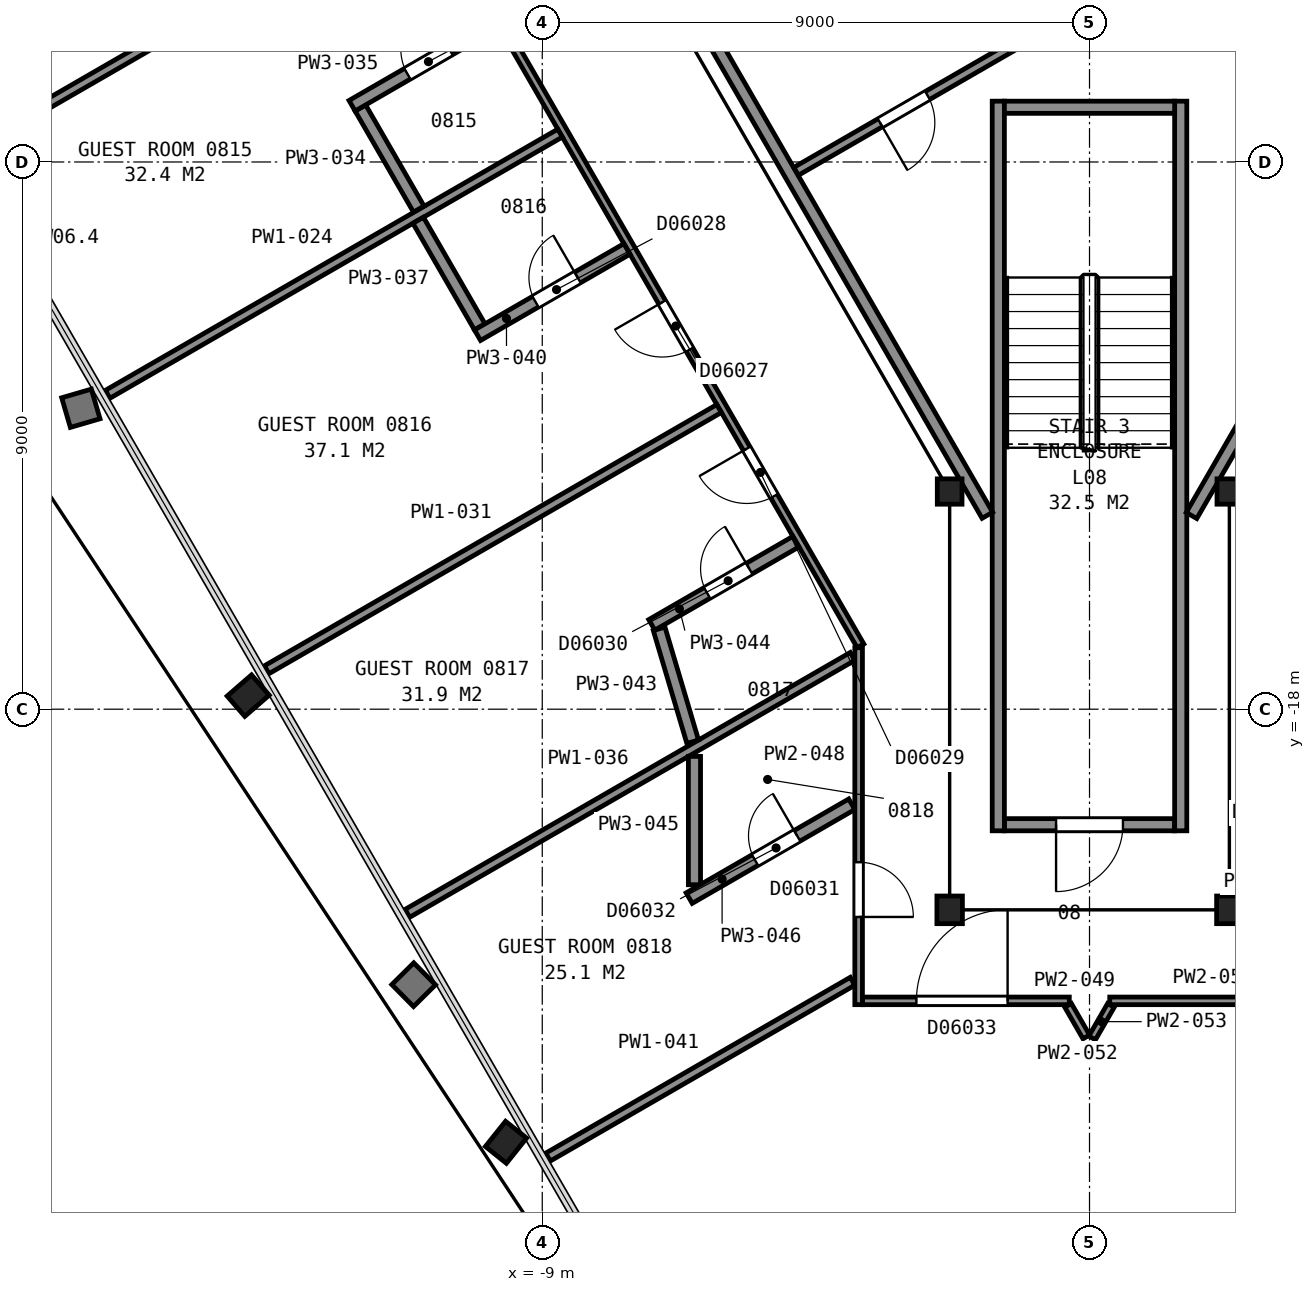
"""IFC4 building model, lengths in metres.
Left out: names, types, materials, properties, quantities, classifications, styles, units other than length and angle.
Written with IfcOpenShell. Run it as: python <this file> out.ifc"""

import sys

from ifc_helpers import new_model, si_unit, direction, frame, frame_2d, origin, origin_2d, place, context, subcontext, project, spatial, rectangle, i_section, extrude, element, fill, save


model = new_model("IFC4")
c1 = context("Model", 3, precision=1e-05, world=origin(), true_north=direction((0.0, 1.0)))
c2 = subcontext(c1, "Body", "Model", "MODEL_VIEW")
j1 = project(units=[si_unit("LENGTHUNIT", "METRE"), si_unit("PLANEANGLEUNIT", "RADIAN")], contexts=[c1])
p1 = place(None, origin())
s1 = spatial("IfcSite", under=j1, at=p1, CompositionType="ELEMENT")
p2 = place(p1, origin())
s2 = spatial("IfcBuilding", under=s1, at=p2, CompositionType="ELEMENT")
p3 = place(p2, frame((0.0, 0.0, 44.0)))
s3 = spatial("IfcBuildingStorey", under=s2, at=p3, CompositionType="ELEMENT", Elevation=44.0)
p4 = place(p3, frame((-13.762, -17.711, 0.025), z_axis=(-0.063592270579, -0.055369132142, 0.996438800092), x_axis=(-0.500488244377, 0.865592544789, 0.016157464095)))
e1 = element("IfcColumn", 1, at=p4, inside=s3, PredefinedType="COLUMN", context=c2, shape_type="SweptSolid", body=[
    extrude(i_section(OverallWidth=0.442, OverallDepth=0.531, WebThickness=0.066, FlangeThickness=0.106, FilletRadius=0.015, at=origin_2d()), origin(), (0.0, 0.0, 1.0), 3.563),
])
p5 = place(p3, frame((-9.531, -25.042, 0.025), z_axis=(-0.055280193141, -0.0691858675, 0.99607098943), x_axis=(-0.500260579817, 0.865270863032, 0.032337066484)))
e2 = element("IfcColumn", 2, at=p5, inside=s3, PredefinedType="COLUMN", context=c2, shape_type="SweptSolid", body=[
    extrude(i_section(OverallWidth=0.442, OverallDepth=0.531, WebThickness=0.066, FlangeThickness=0.106, FilletRadius=0.015, at=origin_2d()), origin(), (0.0, 0.0, 1.0), 3.564),
])
p6 = place(p3, frame((-2.3, -14.42, 0.0), z_axis=(0.0, 0.0, 1.0), x_axis=(1.0, 0.0, 0.0)))
e3 = element("IfcColumn", 3, at=p6, inside=s3, PredefinedType="COLUMN", context=c2, shape_type="SweptSolid", body=[
    extrude(i_section(OverallWidth=0.406, OverallDepth=0.417, WebThickness=0.03, FlangeThickness=0.048, FilletRadius=0.015, at=origin_2d()), origin(), (0.0, 0.0, 1.0), 3.6),
])
for number, where, z_axis, x_axis in (
    (4, (-2.3, -21.3, 0.0), (0.0, 0.0, 1.0), (-1.0, 0.0, 0.0)),
    (5, (2.3, -21.3, 0.0), (0.0, 0.0, 1.0), (-1.0, 0.0, 0.0)),
):
    element("IfcColumn", number, at=place(p3, frame(where, z_axis=z_axis, x_axis=x_axis)), inside=s3, PredefinedType="COLUMN", context=c2, shape_type="SweptSolid", body=[
        extrude(i_section(OverallWidth=0.419, OverallDepth=0.455, WebThickness=0.042, FlangeThickness=0.068, FilletRadius=0.015, at=origin_2d()), origin(), (0.0, 0.0, 1.0), 3.6),
    ])
p7 = place(p3, frame((2.3, -14.42, 0.0), z_axis=(0.0, 0.0, 1.0), x_axis=(1.0, 0.0, 0.0)))
e6 = element("IfcColumn", 6, at=p7, inside=s3, PredefinedType="COLUMN", context=c2, shape_type="SweptSolid", body=[
    extrude(i_section(OverallWidth=0.406, OverallDepth=0.417, WebThickness=0.03, FlangeThickness=0.048, FilletRadius=0.015, at=origin_2d()), origin(), (0.0, 0.0, 1.0), 3.6),
])
p8 = place(p3, frame((-1.4, -19.9, 0.0), z_axis=(0.0, 0.0, 1.0), x_axis=(1.0, 0.0, 0.0)))
e7 = element("IfcWall", 7, at=p8, inside=s3, PredefinedType="PARTITIONING", context=c2, shape_type="SweptSolid", body=[
    extrude(rectangle(XDim=2.8, YDim=0.2, at=frame_2d((1.4, 0.0))), origin(), (0.0, 0.0, 1.0), 3.35),
])
p9 = place(p8, frame((0.85, 0.0, 0.0)))
e8 = element("IfcOpeningElement", 8, at=p9, cuts=e7, PredefinedType="OPENING", context=c2, shape_type="SweptSolid", body=[
    extrude(rectangle(XDim=1.1, YDim=2.1, at=frame_2d((0.55, 1.05))), frame((0.0, 0.11, 0.0), z_axis=(0.0, -1.0, 0.0), x_axis=(1.0, 0.0, 0.0)), (0.0, 0.0, 1.0), 0.22),
])
for number, where, z_axis, x_axis in (
    (9, (1.5, -8.0, 0.0), (0.0, 0.0, 1.0), (0.0, -1.0, 0.0)),
    (10, (-1.5, -8.0, 0.0), (0.0, 0.0, 1.0), (0.0, -1.0, 0.0)),
):
    element("IfcWall", number, at=place(p3, frame(where, z_axis=z_axis, x_axis=x_axis)), inside=s3, PredefinedType="PARTITIONING", context=c2, shape_type="SweptSolid", body=[
        extrude(rectangle(XDim=12.0, YDim=0.2, at=frame_2d((6.0, 0.0))), origin(), (0.0, 0.0, 1.0), 3.35),
    ])
p10 = place(p3, frame((-1.4, -8.1, 0.0), z_axis=(0.0, 0.0, 1.0), x_axis=(1.0, 0.0, 0.0)))
e11 = element("IfcWall", 11, at=p10, inside=s3, PredefinedType="PARTITIONING", context=c2, shape_type="SweptSolid", body=[
    extrude(rectangle(XDim=2.8, YDim=0.2, at=frame_2d((1.4, 0.0))), origin(), (0.0, 0.0, 1.0), 3.35),
])
p11 = place(p3, frame((-13.664, 5.946, 0.0), z_axis=(0.0, 0.0, 1.0), x_axis=(0.499994327219, -0.866028678941, 0.0)))
e12 = element("IfcWall", 12, at=p11, inside=s3, PredefinedType="PARTITIONING", context=c2, shape_type="SweptSolid", body=[
    extrude(rectangle(XDim=23.968, YDim=0.2, at=frame_2d((11.984, 0.0))), origin(), (0.0, 0.0, 1.0), 3.35),
])
p12 = place(p3, frame((-4.825, -9.154, 0.0), z_axis=(0.0, 0.0, 1.0), x_axis=(0.866023738697, 0.500002884005, 0.0)))
e13 = element("IfcWall", 13, at=p12, inside=s3, PredefinedType="PARTITIONING", context=c2, shape_type="SweptSolid", body=[
    extrude(rectangle(XDim=4.22, YDim=0.15, at=frame_2d((2.11, 0.0))), origin(), (0.0, 0.0, 1.0), 3.35),
])
p13 = place(p12, frame((1.595, 0.0, 0.0)))
e14 = element("IfcOpeningElement", 14, at=p13, cuts=e13, PredefinedType="OPENING", context=c2, shape_type="SweptSolid", body=[
    extrude(rectangle(XDim=0.9, YDim=2.1, at=frame_2d((0.45, 1.05))), frame((0.0, 0.085, 0.0), z_axis=(0.0, -1.0, 0.0), x_axis=(1.0, 0.0, 0.0)), (0.0, 0.0, 1.0), 0.17),
])
p14 = place(p3, frame((1.677, -14.815, 0.0), z_axis=(0.0, 0.0, 1.0), x_axis=(0.49999445743, 0.866028603765, 0.0)))
e15 = element("IfcWall", 15, at=p14, inside=s3, PredefinedType="PARTITIONING", context=c2, shape_type="SweptSolid", body=[
    extrude(rectangle(XDim=5.905, YDim=0.2, at=frame_2d((2.952, 0.0))), origin(), (0.0, 0.0, 1.0), 3.35),
])
p15 = place(p14, frame((3.855, 0.0, 0.0)))
e16 = element("IfcOpeningElement", 16, at=p15, cuts=e15, PredefinedType="OPENING", context=c2, shape_type="SweptSolid", body=[
    extrude(rectangle(XDim=1.8, YDim=2.1, at=frame_2d((0.9, 1.05))), frame((0.0, 0.11, 0.0), z_axis=(0.0, -1.0, 0.0), x_axis=(1.0, 0.0, 0.0)), (0.0, 0.0, 1.0), 0.22),
])
p16 = place(p3, frame((-18.462, -8.813, 0.0), z_axis=(0.0, 0.0, 1.0), x_axis=(0.866029425019, 0.499993034952, 0.0)))
e17 = element("IfcWall", 17, at=p16, inside=s3, PredefinedType="PARTITIONING", context=c2, shape_type="SweptSolid", body=[
    extrude(rectangle(XDim=8.591, YDim=0.15, at=frame_2d((4.296, 0.0))), origin(), (0.0, 0.0, 1.0), 2.613),
])
p17 = place(p3, frame((-3.766, -16.958, 0.0), z_axis=(0.0, 0.0, 1.0), x_axis=(-0.500024758804, 0.866011108811, 0.0)))
e18 = element("IfcWall", 18, at=p17, inside=s3, PredefinedType="PARTITIONING", context=c2, shape_type="SweptSolid", body=[
    extrude(rectangle(XDim=26.402, YDim=0.125, at=frame_2d((13.201, 0.0))), origin(), (0.0, 0.0, 1.0), 2.613),
])
p18 = place(p17, frame((25.139, 0.0, 0.0)))
e19 = element("IfcOpeningElement", 19, at=p18, cuts=e18, PredefinedType="OPENING", context=c2, shape_type="SweptSolid", body=[
    extrude(rectangle(XDim=0.9, YDim=2.1, at=frame_2d((0.45, 1.05))), frame((0.0, 0.073, 0.0), z_axis=(0.0, -1.0, 0.0), x_axis=(1.0, 0.0, 0.0)), (0.0, 0.0, 1.0), 0.145),
])
p19 = place(p17, frame((22.963, 0.0, 0.0)))
e20 = element("IfcOpeningElement", 20, at=p19, cuts=e18, PredefinedType="OPENING", context=c2, shape_type="SweptSolid", body=[
    extrude(rectangle(XDim=1.0, YDim=2.1, at=frame_2d((0.5, 1.05))), frame((0.0, 0.073, 0.0), z_axis=(0.0, -1.0, 0.0), x_axis=(1.0, 0.0, 0.0)), (0.0, 0.0, 1.0), 0.145),
])
p20 = place(p17, frame((15.228, 0.0, 0.0)))
e21 = element("IfcOpeningElement", 21, at=p20, cuts=e18, PredefinedType="OPENING", context=c2, shape_type="SweptSolid", body=[
    extrude(rectangle(XDim=0.9, YDim=2.1, at=frame_2d((0.45, 1.05))), frame((0.0, 0.073, 0.0), z_axis=(0.0, -1.0, 0.0), x_axis=(1.0, 0.0, 0.0)), (0.0, 0.0, 1.0), 0.145),
])
p21 = place(p17, frame((12.702, 0.0, 0.0)))
e22 = element("IfcOpeningElement", 22, at=p21, cuts=e18, PredefinedType="OPENING", context=c2, shape_type="SweptSolid", body=[
    extrude(rectangle(XDim=0.9, YDim=2.1, at=frame_2d((0.45, 1.05))), frame((0.0, 0.073, 0.0), z_axis=(0.0, -1.0, 0.0), x_axis=(1.0, 0.0, 0.0)), (0.0, 0.0, 1.0), 0.145),
])
p22 = place(p17, frame((5.624, 0.0, 0.0)))
e23 = element("IfcOpeningElement", 23, at=p22, cuts=e18, PredefinedType="OPENING", context=c2, shape_type="SweptSolid", body=[
    extrude(rectangle(XDim=0.9, YDim=2.1, at=frame_2d((0.45, 1.05))), frame((0.0, 0.073, 0.0), z_axis=(0.0, -1.0, 0.0), x_axis=(1.0, 0.0, 0.0)), (0.0, 0.0, 1.0), 0.145),
])
p23 = place(p17, frame((2.843, 0.0, 0.0)))
e24 = element("IfcOpeningElement", 24, at=p23, cuts=e18, PredefinedType="OPENING", context=c2, shape_type="SweptSolid", body=[
    extrude(rectangle(XDim=0.9, YDim=2.1, at=frame_2d((0.45, 1.05))), frame((0.0, 0.073, 0.0), z_axis=(0.0, -1.0, 0.0), x_axis=(1.0, 0.0, 0.0)), (0.0, 0.0, 1.0), 0.145),
])
p24 = place(p3, frame((-16.148, -12.821, 0.0), z_axis=(0.0, 0.0, 1.0), x_axis=(0.866036528751, 0.499980730498, 0.0)))
e25 = element("IfcWall", 25, at=p24, inside=s3, PredefinedType="PARTITIONING", context=c2, shape_type="SweptSolid", body=[
    extrude(rectangle(XDim=8.592, YDim=0.15, at=frame_2d((4.296, 0.0))), origin(), (0.0, 0.0, 1.0), 2.613),
])
p25 = place(p3, frame((-13.532, -17.351, 0.0), z_axis=(0.0, 0.0, 1.0), x_axis=(0.866002910178, 0.500038958046, 0.0)))
e26 = element("IfcWall", 26, at=p25, inside=s3, PredefinedType="PARTITIONING", context=c2, shape_type="SweptSolid", body=[
    extrude(rectangle(XDim=8.591, YDim=0.15, at=frame_2d((4.295, 0.0))), origin(), (0.0, 0.0, 1.0), 2.613),
])
p26 = place(p3, frame((-11.991, -8.112, 0.0), z_axis=(0.0, 0.0, 1.0), x_axis=(0.499913221443, -0.866075499611, 0.0)))
e27 = element("IfcWall", 27, at=p26, inside=s3, PredefinedType="PARTITIONING", context=c2, shape_type="SweptSolid", body=[
    extrude(rectangle(XDim=1.92, YDim=0.2, at=frame_2d((0.96, 0.0))), origin(), (0.0, 0.0, 1.0), 2.613),
])
p27 = place(p3, frame((-9.761, -6.709, 0.0), z_axis=(0.0, 0.0, 1.0), x_axis=(-0.866012976267, -0.500021524473, 0.0)))
e28 = element("IfcWall", 28, at=p27, inside=s3, PredefinedType="PARTITIONING", context=c2, shape_type="SweptSolid", body=[
    extrude(rectangle(XDim=2.732, YDim=0.2, at=frame_2d((1.366, 0.0))), origin(), (0.0, 0.0, 1.0), 2.613),
])
p28 = place(p27, frame((0.882, 0.0, 0.0)))
e29 = element("IfcOpeningElement", 29, at=p28, cuts=e28, PredefinedType="OPENING", context=c2, shape_type="SweptSolid", body=[
    extrude(rectangle(XDim=0.8, YDim=2.1, at=frame_2d((0.4, 1.05))), frame((0.0, 0.11, 0.0), z_axis=(0.0, -1.0, 0.0), x_axis=(1.0, 0.0, 0.0)), (0.0, 0.0, 1.0), 0.22),
])
p29 = place(p3, frame((-11.219, -21.358, 0.0), z_axis=(0.0, 0.0, 1.0), x_axis=(0.866084603656, 0.499897448793, 0.0)))
e30 = element("IfcWall", 30, at=p29, inside=s3, PredefinedType="PARTITIONING", context=c2, shape_type="SweptSolid", body=[
    extrude(rectangle(XDim=8.454, YDim=0.15, at=frame_2d((4.227, 0.0))), origin(), (0.0, 0.0, 1.0), 2.613),
])
p30 = place(p3, frame((-11.041, -9.959, 0.0), z_axis=(0.0, 0.0, 1.0), x_axis=(0.500042536776, -0.866000843773, 0.0)))
e31 = element("IfcWall", 31, at=p30, inside=s3, PredefinedType="PARTITIONING", context=c2, shape_type="SweptSolid", body=[
    extrude(rectangle(XDim=2.025, YDim=0.2, at=frame_2d((1.012, 0.0))), origin(), (0.0, 0.0, 1.0), 2.613),
])
p31 = place(p3, frame((-10.065, -11.849, 0.0), z_axis=(0.0, 0.0, 1.0), x_axis=(0.866048046904, 0.499960778915, 0.0)))
e32 = element("IfcWall", 32, at=p31, inside=s3, PredefinedType="PARTITIONING", context=c2, shape_type="SweptSolid", body=[
    extrude(rectangle(XDim=2.838, YDim=0.2, at=frame_2d((1.419, 0.0))), origin(), (0.0, 0.0, 1.0), 2.613),
])
p32 = place(p31, frame((1.1, 0.0, 0.0)))
e33 = element("IfcOpeningElement", 33, at=p32, cuts=e32, PredefinedType="OPENING", context=c2, shape_type="SweptSolid", body=[
    extrude(rectangle(XDim=0.8, YDim=2.1, at=frame_2d((0.4, 1.05))), frame((0.0, 0.11, 0.0), z_axis=(0.0, -1.0, 0.0), x_axis=(1.0, 0.0, 0.0)), (0.0, 0.0, 1.0), 0.22),
])
p33 = place(p3, frame((-8.905, -25.366, 0.0), z_axis=(0.0, 0.0, 1.0), x_axis=(0.866025977343, 0.499999006567, 0.0)))
e34 = element("IfcWall", 34, at=p33, inside=s3, PredefinedType="PARTITIONING", context=c2, shape_type="SweptSolid", body=[
    extrude(rectangle(XDim=5.782, YDim=0.15, at=frame_2d((2.891, 0.0))), origin(), (0.0, 0.0, 1.0), 2.613),
])
p34 = place(p3, frame((-7.078, -16.678, 0.0), z_axis=(0.0, 0.0, 1.0), x_axis=(0.284907685531, -0.958554959679, 0.0)))
e35 = element("IfcWall", 35, at=p34, inside=s3, PredefinedType="PARTITIONING", context=c2, shape_type="SweptSolid", body=[
    extrude(rectangle(XDim=1.938, YDim=0.2, at=frame_2d((0.969, 0.0))), origin(), (0.0, 0.0, 1.0), 2.613),
])
p35 = place(p3, frame((-4.828, -15.244, 0.0), z_axis=(0.0, 0.0, 1.0), x_axis=(-0.86596722502, -0.50010075504, 0.0)))
e36 = element("IfcWall", 36, at=p35, inside=s3, PredefinedType="PARTITIONING", context=c2, shape_type="SweptSolid", body=[
    extrude(rectangle(XDim=2.737, YDim=0.2, at=frame_2d((1.369, 0.0))), origin(), (0.0, 0.0, 1.0), 2.613),
])
p36 = place(p35, frame((0.887, 0.0, 0.0)))
e37 = element("IfcOpeningElement", 37, at=p36, cuts=e36, PredefinedType="OPENING", context=c2, shape_type="SweptSolid", body=[
    extrude(rectangle(XDim=0.8, YDim=2.1, at=frame_2d((0.4, 1.05))), frame((0.0, 0.11, 0.0), z_axis=(0.0, -1.0, 0.0), x_axis=(1.0, 0.0, 0.0)), (0.0, 0.0, 1.0), 0.22),
])
p37 = place(p3, frame((-6.497, -20.887, 0.0), z_axis=(0.0, 0.0, 1.0), x_axis=(0.0, 1.0, 0.0)))
e38 = element("IfcWall", 38, at=p37, inside=s3, PredefinedType="PARTITIONING", context=c2, shape_type="SweptSolid", body=[
    extrude(rectangle(XDim=2.111, YDim=0.2, at=frame_2d((1.055, 0.0))), origin(), (0.0, 0.0, 1.0), 2.613),
])
p38 = place(p3, frame((-6.583, -21.107, 0.0), z_axis=(0.0, 0.0, 1.0), x_axis=(0.866015731669, 0.500016752221, 0.0)))
e39 = element("IfcWall", 39, at=p38, inside=s3, PredefinedType="PARTITIONING", context=c2, shape_type="SweptSolid", body=[
    extrude(rectangle(XDim=3.088, YDim=0.2, at=frame_2d((1.544, 0.0))), origin(), (0.0, 0.0, 1.0), 2.613),
])
p39 = place(p38, frame((1.25, 0.0, 0.0)))
e40 = element("IfcOpeningElement", 40, at=p39, cuts=e39, PredefinedType="OPENING", context=c2, shape_type="SweptSolid", body=[
    extrude(rectangle(XDim=0.8, YDim=2.1, at=frame_2d((0.4, 1.05))), frame((0.0, 0.11, 0.0), z_axis=(0.0, -1.0, 0.0), x_axis=(1.0, 0.0, 0.0)), (0.0, 0.0, 1.0), 0.22),
])
p40 = place(p3, frame((-3.797, -22.86, 0.0), z_axis=(0.0, 0.0, 1.0), x_axis=(0.0, 1.0, 0.0)))
e41 = element("IfcWall", 41, at=p40, inside=s3, PredefinedType="PARTITIONING", context=c2, shape_type="SweptSolid", body=[
    extrude(rectangle(XDim=5.871, YDim=0.125, at=frame_2d((2.935, 0.0))), origin(), (0.0, 0.0, 1.0), 2.613),
])
p41 = place(p40, frame((1.442, 0.0, 0.0)))
e42 = element("IfcOpeningElement", 42, at=p41, cuts=e41, PredefinedType="OPENING", context=c2, shape_type="SweptSolid", body=[
    extrude(rectangle(XDim=0.9, YDim=2.1, at=frame_2d((0.45, 1.05))), frame((0.0, 0.073, 0.0), z_axis=(0.0, -1.0, 0.0), x_axis=(1.0, 0.0, 0.0)), (0.0, 0.0, 1.0), 0.145),
])
p42 = place(p3, frame((-0.333, -22.797, 0.0), z_axis=(0.0, 0.0, 1.0), x_axis=(-1.0, 0.0, 0.0)))
e43 = element("IfcWall", 43, at=p42, inside=s3, PredefinedType="PARTITIONING", context=c2, shape_type="SweptSolid", body=[
    extrude(rectangle(XDim=3.399, YDim=0.125, at=frame_2d((1.7, 0.0))), origin(), (0.0, 0.0, 1.0), 2.613),
])
p43 = place(p42, frame((1.014, 0.0, 0.0)))
e44 = element("IfcOpeningElement", 44, at=p43, cuts=e43, PredefinedType="OPENING", context=c2, shape_type="SweptSolid", body=[
    extrude(rectangle(XDim=1.5, YDim=2.1, at=frame_2d((0.75, 1.05))), frame((0.0, 0.073, 0.0), z_axis=(0.0, -1.0, 0.0), x_axis=(1.0, 0.0, 0.0)), (0.0, 0.0, 1.0), 0.145),
])
p44 = place(p3, frame((-0.353, -22.871, 0.0), z_axis=(0.0, 0.0, 1.0), x_axis=(0.499863517517, -0.866104187645, 0.0)))
e45 = element("IfcWall", 45, at=p44, inside=s3, PredefinedType="PARTITIONING", context=c2, shape_type="SweptSolid", body=[
    extrude(rectangle(XDim=0.599, YDim=0.125, at=frame_2d((0.3, 0.0))), origin(), (0.0, 0.0, 1.0), 2.613),
])
p45 = place(p3, frame((0.043, -23.407, 0.0), z_axis=(0.0, 0.0, 1.0), x_axis=(0.499870333213, 0.866100253997, 0.0)))
e46 = element("IfcWall", 46, at=p45, inside=s3, PredefinedType="PARTITIONING", context=c2, shape_type="SweptSolid", body=[
    extrude(rectangle(XDim=0.619, YDim=0.125, at=frame_2d((0.31, 0.0))), origin(), (0.0, 0.0, 1.0), 2.613),
])
p46 = place(p3, frame((0.333, -22.797, 0.0), z_axis=(0.0, 0.0, 1.0), x_axis=(1.0, 0.0, 0.0)))
e47 = element("IfcWall", 47, at=p46, inside=s3, PredefinedType="PARTITIONING", context=c2, shape_type="SweptSolid", body=[
    extrude(rectangle(XDim=3.399, YDim=0.125, at=frame_2d((1.7, 0.0))), origin(), (0.0, 0.0, 1.0), 2.613),
])
p47 = place(p9, origin())
e48 = element("IfcDoor", 48, at=p47, inside=s3, OperationType="SINGLE_SWING_LEFT", PredefinedType="DOOR", context=c2, shape_type="SweptSolid", body=[
    extrude(rectangle(XDim=1.1, YDim=2.1, at=frame_2d((0.55, 1.05))), frame((0.0, 0.025, 0.0), z_axis=(0.0, -1.0, 0.0), x_axis=(1.0, 0.0, 0.0)), (0.0, 0.0, 1.0), 0.05),
])
fill(e8, e48)
p48 = place(p13, origin())
e49 = element("IfcDoor", 49, at=p48, inside=s3, OperationType="SINGLE_SWING_LEFT", PredefinedType="DOOR", context=c2, shape_type="SweptSolid", body=[
    extrude(rectangle(XDim=0.9, YDim=2.1, at=frame_2d((0.45, 1.05))), frame((0.0, 0.025, 0.0), z_axis=(0.0, -1.0, 0.0), x_axis=(1.0, 0.0, 0.0)), (0.0, 0.0, 1.0), 0.05),
])
fill(e14, e49)
p49 = place(p22, origin())
e50 = element("IfcDoor", 50, at=p49, inside=s3, OperationType="SINGLE_SWING_RIGHT", PredefinedType="DOOR", context=c2, shape_type="SweptSolid", body=[
    extrude(rectangle(XDim=0.9, YDim=2.1, at=frame_2d((0.45, 1.05))), frame((0.0, 0.025, 0.0), z_axis=(0.0, -1.0, 0.0), x_axis=(1.0, 0.0, 0.0)), (0.0, 0.0, 1.0), 0.05),
])
fill(e23, e50)
p50 = place(p23, origin())
e51 = element("IfcDoor", 51, at=p50, inside=s3, OperationType="SINGLE_SWING_RIGHT", PredefinedType="DOOR", context=c2, shape_type="SweptSolid", body=[
    extrude(rectangle(XDim=0.9, YDim=2.1, at=frame_2d((0.45, 1.05))), frame((0.0, 0.025, 0.0), z_axis=(0.0, -1.0, 0.0), x_axis=(1.0, 0.0, 0.0)), (0.0, 0.0, 1.0), 0.05),
])
fill(e24, e51)
p51 = place(p28, origin())
e52 = element("IfcDoor", 52, at=p51, inside=s3, OperationType="SINGLE_SWING_LEFT", PredefinedType="DOOR", context=c2, shape_type="SweptSolid", body=[
    extrude(rectangle(XDim=0.8, YDim=2.1, at=frame_2d((0.4, 1.05))), frame((0.0, 0.025, 0.0), z_axis=(0.0, -1.0, 0.0), x_axis=(1.0, 0.0, 0.0)), (0.0, 0.0, 1.0), 0.05),
])
fill(e29, e52)
p52 = place(p32, origin())
e53 = element("IfcDoor", 53, at=p52, inside=s3, OperationType="SINGLE_SWING_RIGHT", PredefinedType="DOOR", context=c2, shape_type="SweptSolid", body=[
    extrude(rectangle(XDim=0.8, YDim=2.1, at=frame_2d((0.4, 1.05))), frame((0.0, 0.025, 0.0), z_axis=(0.0, -1.0, 0.0), x_axis=(1.0, 0.0, 0.0)), (0.0, 0.0, 1.0), 0.05),
])
fill(e33, e53)
p53 = place(p36, origin())
e54 = element("IfcDoor", 54, at=p53, inside=s3, OperationType="SINGLE_SWING_LEFT", PredefinedType="DOOR", context=c2, shape_type="SweptSolid", body=[
    extrude(rectangle(XDim=0.8, YDim=2.1, at=frame_2d((0.4, 1.05))), frame((0.0, 0.025, 0.0), z_axis=(0.0, -1.0, 0.0), x_axis=(1.0, 0.0, 0.0)), (0.0, 0.0, 1.0), 0.05),
])
fill(e37, e54)
p54 = place(p39, origin())
e55 = element("IfcDoor", 55, at=p54, inside=s3, OperationType="SINGLE_SWING_RIGHT", PredefinedType="DOOR", context=c2, shape_type="SweptSolid", body=[
    extrude(rectangle(XDim=0.8, YDim=2.1, at=frame_2d((0.4, 1.05))), frame((0.0, 0.025, 0.0), z_axis=(0.0, -1.0, 0.0), x_axis=(1.0, 0.0, 0.0)), (0.0, 0.0, 1.0), 0.05),
])
fill(e40, e55)
p55 = place(p41, origin())
e56 = element("IfcDoor", 56, at=p55, inside=s3, OperationType="SINGLE_SWING_LEFT", PredefinedType="DOOR", context=c2, shape_type="SweptSolid", body=[
    extrude(rectangle(XDim=0.9, YDim=2.1, at=frame_2d((0.45, 1.05))), frame((0.0, 0.025, 0.0), z_axis=(0.0, -1.0, 0.0), x_axis=(1.0, 0.0, 0.0)), (0.0, 0.0, 1.0), 0.05),
])
fill(e42, e56)
p56 = place(p43, origin())
e57 = element("IfcDoor", 57, at=p56, inside=s3, OperationType="DOUBLE_DOOR_SINGLE_SWING", PredefinedType="DOOR", context=c2, shape_type="SweptSolid", body=[
    extrude(rectangle(XDim=1.5, YDim=2.1, at=frame_2d((0.75, 1.05))), frame((0.0, 0.025, 0.0), z_axis=(0.0, -1.0, 0.0), x_axis=(1.0, 0.0, 0.0)), (0.0, 0.0, 1.0), 0.05),
])
fill(e44, e57)
save(model, sys.argv[1])
